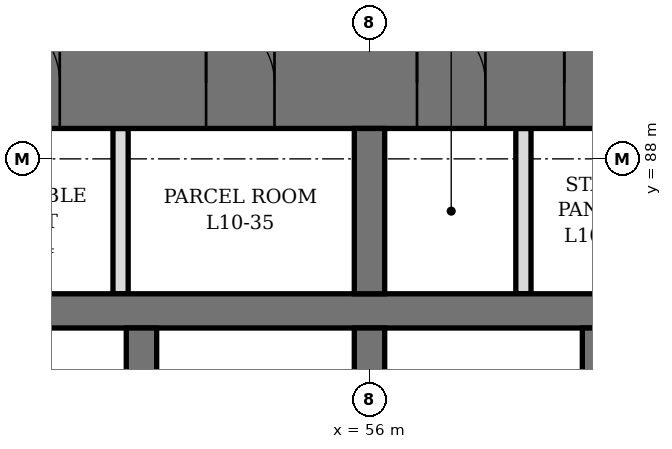
"""IFC4 building model, lengths in metres.
Left out: names, types, materials, properties, quantities, classifications, styles, units other than length and angle.
Written with IfcOpenShell. Run it as: python <this file> out.ifc"""

import sys

from ifc_helpers import new_model, si_unit, direction, frame, frame_2d, origin, place, context, subcontext, project, spatial, rectangle, extrude, element, fill, save


model = new_model("IFC4")
c1 = context("Model", 3, precision=1e-05, world=origin(), true_north=direction((0.0, 1.0)))
c2 = subcontext(c1, "Body", "Model", "MODEL_VIEW")
j1 = project(units=[si_unit("LENGTHUNIT", "METRE"), si_unit("PLANEANGLEUNIT", "RADIAN")], contexts=[c1])
p1 = place(None, origin())
s1 = spatial("IfcSite", under=j1, at=p1, CompositionType="ELEMENT")
p2 = place(p1, origin())
s2 = spatial("IfcBuilding", under=s1, at=p2, CompositionType="ELEMENT")
p3 = place(p2, frame((0.0, 0.0, 51.7)))
s3 = spatial("IfcBuildingStorey", under=s2, at=p3, CompositionType="ELEMENT", Elevation=51.7)
p4 = place(p3, frame((44.6, 89.0, 0.0), z_axis=(0.0, 0.0, 1.0), x_axis=(1.0, 0.0, 0.0)))
e1 = element("IfcWall", 1, at=p4, inside=s3, PredefinedType="SHEAR", context=c2, shape_type="SweptSolid", body=[
    extrude(rectangle(XDim=22.8, YDim=1.2, at=frame_2d((11.4, 0.0))), origin(), (0.0, 0.0, 1.0), 4.2),
])
p5 = place(p4, frame((6.325, 0.0, 0.0)))
e2 = element("IfcOpeningElement", 2, at=p5, cuts=e1, PredefinedType="OPENING", context=c2, shape_type="SweptSolid", body=[
    extrude(rectangle(XDim=1.0, YDim=2.1, at=frame_2d((0.5, 1.05))), frame((0.0, 0.61, 0.0), z_axis=(0.0, -1.0, 0.0), x_axis=(1.0, 0.0, 0.0)), (0.0, 0.0, 1.0), 1.22),
])
p6 = place(p4, frame((9.25, 0.0, 0.0)))
e3 = element("IfcOpeningElement", 3, at=p6, cuts=e1, PredefinedType="OPENING", context=c2, shape_type="SweptSolid", body=[
    extrude(rectangle(XDim=0.9, YDim=2.1, at=frame_2d((0.45, 1.05))), frame((0.0, 0.61, 0.0), z_axis=(0.0, -1.0, 0.0), x_axis=(1.0, 0.0, 0.0)), (0.0, 0.0, 1.0), 1.22),
])
p7 = place(p4, frame((12.025, 0.0, 0.0)))
e4 = element("IfcOpeningElement", 4, at=p7, cuts=e1, PredefinedType="OPENING", context=c2, shape_type="SweptSolid", body=[
    extrude(rectangle(XDim=0.9, YDim=2.1, at=frame_2d((0.45, 1.05))), frame((0.0, 0.61, 0.0), z_axis=(0.0, -1.0, 0.0), x_axis=(1.0, 0.0, 0.0)), (0.0, 0.0, 1.0), 1.22),
])
p8 = place(p4, frame((13.962, 0.0, 0.0)))
e5 = element("IfcOpeningElement", 5, at=p8, cuts=e1, PredefinedType="OPENING", context=c2, shape_type="SweptSolid", body=[
    extrude(rectangle(XDim=0.9, YDim=2.1, at=frame_2d((0.45, 1.05))), frame((0.0, 0.61, 0.0), z_axis=(0.0, -1.0, 0.0), x_axis=(1.0, 0.0, 0.0)), (0.0, 0.0, 1.0), 1.22),
])
p9 = place(p3, frame((50.225, 86.0, 0.0), z_axis=(0.0, 0.0, 1.0), x_axis=(1.0, 0.0, 0.0)))
e6 = element("IfcWall", 6, at=p9, inside=s3, PredefinedType="SHEAR", context=c2, shape_type="SweptSolid", body=[
    extrude(rectangle(XDim=11.55, YDim=0.45, at=frame_2d((5.775, 0.0))), origin(), (0.0, 0.0, 1.0), 4.2),
])
for number, where, z_axis, x_axis in (
    (7, (53.0, 82.225, 0.0), (0.0, 0.0, 1.0), (0.0, 1.0, 0.0)),
    (8, (56.0, 82.225, 0.0), (0.0, 0.0, 1.0), (0.0, 1.0, 0.0)),
    (9, (59.0, 82.225, 0.0), (0.0, 0.0, 1.0), (0.0, 1.0, 0.0)),
):
    element("IfcWall", number, at=place(p3, frame(where, z_axis=z_axis, x_axis=x_axis)), inside=s3, PredefinedType="SHEAR", context=c2, shape_type="SweptSolid", body=[
        extrude(rectangle(XDim=3.55, YDim=0.4, at=frame_2d((1.775, 0.0))), origin(), (0.0, 0.0, 1.0), 4.2),
    ])
p10 = place(p3, frame((56.0, 86.225, 0.0), z_axis=(0.0, 0.0, 1.0), x_axis=(0.0, 1.0, 0.0)))
e10 = element("IfcWall", 10, at=p10, inside=s3, PredefinedType="SHEAR", context=c2, shape_type="SweptSolid", body=[
    extrude(rectangle(XDim=2.175, YDim=0.4, at=frame_2d((1.087, 0.0))), origin(), (0.0, 0.0, 1.0), 4.2),
])
for number, where, z_axis, x_axis in (
    (11, (52.725, 86.225, 0.0), (0.0, 0.0, 1.0), (0.0, 1.0, 0.0)),
    (12, (58.025, 86.225, 0.0), (0.0, 0.0, 1.0), (0.0, 1.0, 0.0)),
):
    element("IfcWall", number, at=place(p3, frame(where, z_axis=z_axis, x_axis=x_axis)), inside=s3, PredefinedType="PARTITIONING", context=c2, shape_type="SweptSolid", body=[
        extrude(rectangle(XDim=2.175, YDim=0.2, at=frame_2d((1.087, 0.0))), origin(), (0.0, 0.0, 1.0), 4.04),
    ])
p11 = place(p5, origin())
e13 = element("IfcDoor", 13, at=p11, inside=s3, OperationType="SINGLE_SWING_LEFT", PredefinedType="DOOR", context=c2, shape_type="SweptSolid", body=[
    extrude(rectangle(XDim=1.0, YDim=2.1, at=frame_2d((0.5, 1.05))), frame((0.0, 0.35, 0.0), z_axis=(0.0, -1.0, 0.0), x_axis=(1.0, 0.0, 0.0)), (0.0, 0.0, 1.0), 0.7),
])
fill(e2, e13)
p12 = place(p6, origin())
e14 = element("IfcDoor", 14, at=p12, inside=s3, OperationType="SINGLE_SWING_LEFT", PredefinedType="DOOR", context=c2, shape_type="SweptSolid", body=[
    extrude(rectangle(XDim=0.9, YDim=2.1, at=frame_2d((0.45, 1.05))), frame((0.0, 0.35, 0.0), z_axis=(0.0, -1.0, 0.0), x_axis=(1.0, 0.0, 0.0)), (0.0, 0.0, 1.0), 0.7),
])
fill(e3, e14)
p13 = place(p7, origin())
e15 = element("IfcDoor", 15, at=p13, inside=s3, OperationType="SINGLE_SWING_LEFT", PredefinedType="DOOR", context=c2, shape_type="SweptSolid", body=[
    extrude(rectangle(XDim=0.9, YDim=2.1, at=frame_2d((0.45, 1.05))), frame((0.0, 0.35, 0.0), z_axis=(0.0, -1.0, 0.0), x_axis=(1.0, 0.0, 0.0)), (0.0, 0.0, 1.0), 0.7),
])
fill(e4, e15)
p14 = place(p8, origin())
e16 = element("IfcDoor", 16, at=p14, inside=s3, OperationType="SINGLE_SWING_LEFT", PredefinedType="DOOR", context=c2, shape_type="SweptSolid", body=[
    extrude(rectangle(XDim=0.9, YDim=2.1, at=frame_2d((0.45, 1.05))), frame((0.0, 0.35, 0.0), z_axis=(0.0, -1.0, 0.0), x_axis=(1.0, 0.0, 0.0)), (0.0, 0.0, 1.0), 0.7),
])
fill(e5, e16)
save(model, sys.argv[1])
